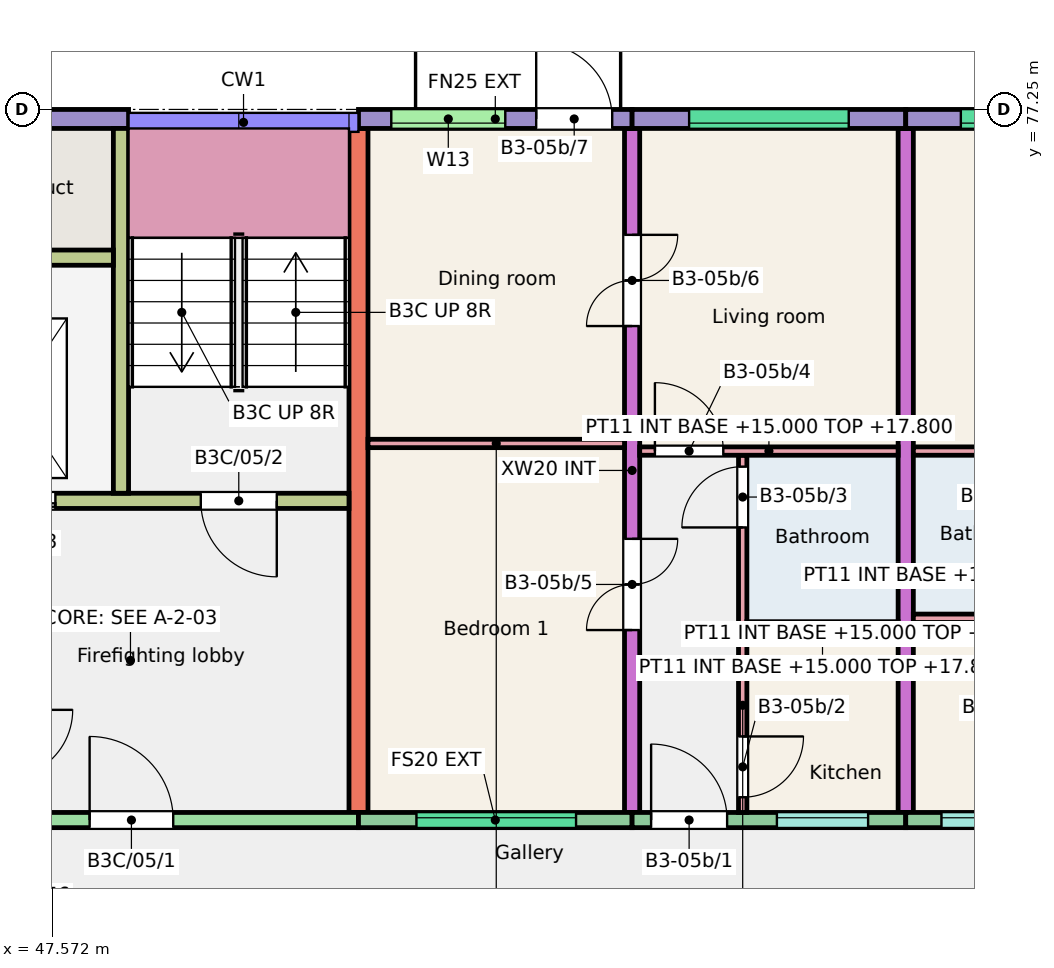
"""IFC4 building model, lengths in metres.
Left out: names, types, materials, properties, quantities, classifications, styles, units other than length and angle.
Written with IfcOpenShell. Run it as: python <this file> out.ifc"""

import sys

from ifc_helpers import new_model, si_unit, direction, frame, frame_2d, origin, place, context, subcontext, project, spatial, rectangle, extrude, element, fill, save


model = new_model("IFC4")
c1 = context("Model", 3, precision=1e-05, world=origin(), true_north=direction((0.0, 1.0)))
c2 = subcontext(c1, "Body", "Model", "MODEL_VIEW")
j1 = project(units=[si_unit("LENGTHUNIT", "METRE"), si_unit("PLANEANGLEUNIT", "RADIAN")], contexts=[c1])
p1 = place(None, origin())
s1 = spatial("IfcSite", under=j1, at=p1, CompositionType="ELEMENT")
p2 = place(p1, origin())
s2 = spatial("IfcBuilding", under=s1, at=p2, CompositionType="ELEMENT")
p3 = place(p2, frame((0.0, 0.0, 15.0)))
s3 = spatial("IfcBuildingStorey", under=s2, at=p3, CompositionType="ELEMENT", Elevation=15.0)
p4 = place(p3, frame((51.6, 68.0, 0.0), z_axis=(0.0, 0.0, 1.0), x_axis=(0.0, 1.0, 0.0)))
e1 = element("IfcWall", 1, at=p4, inside=s3, PredefinedType="SHEAR", context=c2, shape_type="SweptSolid", body=[
    extrude(rectangle(XDim=9.0, YDim=0.25, at=frame_2d((4.5, 0.0))), origin(), (0.0, 0.0, 1.0), 3.0),
])
p5 = place(p3, frame((55.2, 68.0, 0.0), z_axis=(0.0, 0.0, 1.0), x_axis=(0.0, 1.0, 0.0)))
e2 = element("IfcWall", 2, at=p5, inside=s3, PredefinedType="SHEAR", context=c2, shape_type="SweptSolid", body=[
    extrude(rectangle(XDim=9.0, YDim=0.2, at=frame_2d((4.5, 0.0))), origin(), (0.0, 0.0, 1.0), 3.0),
])
p6 = place(p5, frame((2.4, 0.0, 0.0)))
e3 = element("IfcOpeningElement", 3, at=p6, cuts=e2, PredefinedType="OPENING", context=c2, shape_type="SweptSolid", body=[
    extrude(rectangle(XDim=1.2, YDim=2.1, at=frame_2d((0.6, 1.05))), frame((0.0, 0.11, 0.0), z_axis=(0.0, -1.0, 0.0), x_axis=(1.0, 0.0, 0.0)), (0.0, 0.0, 1.0), 0.22),
])
p7 = place(p5, frame((6.4, 0.0, 0.0)))
e4 = element("IfcOpeningElement", 4, at=p7, cuts=e2, PredefinedType="OPENING", context=c2, shape_type="SweptSolid", body=[
    extrude(rectangle(XDim=1.2, YDim=2.1, at=frame_2d((0.6, 1.05))), frame((0.0, 0.11, 0.0), z_axis=(0.0, -1.0, 0.0), x_axis=(1.0, 0.0, 0.0)), (0.0, 0.0, 1.0), 0.22),
])
p8 = place(p3, frame((58.8, 68.0, 0.0), z_axis=(0.0, 0.0, 1.0), x_axis=(0.0, 1.0, 0.0)))
e5 = element("IfcWall", 5, at=p8, inside=s3, PredefinedType="SHEAR", context=c2, shape_type="SweptSolid", body=[
    extrude(rectangle(XDim=9.0, YDim=0.2, at=frame_2d((4.5, 0.0))), origin(), (0.0, 0.0, 1.0), 3.0),
])
p9 = place(p3, frame((45.6, 77.125, 0.0), z_axis=(0.0, 0.0, 1.0), x_axis=(1.0, 0.0, 0.0)))
e6 = element("IfcWall", 6, at=p9, inside=s3, PredefinedType="SOLIDWALL", context=c2, shape_type="SweptSolid", body=[
    extrude(rectangle(XDim=2.975, YDim=0.25, at=frame_2d((1.487, 0.0))), origin(), (0.0, 0.0, 1.0), 3.0),
])
p10 = place(p3, frame((45.75, 67.9, 0.0), z_axis=(0.0, 0.0, 1.0), x_axis=(1.0, 0.0, 0.0)))
e7 = element("IfcWall", 7, at=p10, inside=s3, PredefinedType="SHEAR", context=c2, shape_type="SweptSolid", body=[
    extrude(rectangle(XDim=5.85, YDim=0.2, at=frame_2d((2.925, 0.0))), origin(), (0.0, 0.0, 1.0), 3.0),
])
p11 = place(p10, frame((2.312, 0.0, 0.0)))
e8 = element("IfcOpeningElement", 8, at=p11, cuts=e7, PredefinedType="OPENING", context=c2, shape_type="SweptSolid", body=[
    extrude(rectangle(XDim=1.1, YDim=2.1, at=frame_2d((0.55, 1.05))), frame((0.0, 0.11, 0.0), z_axis=(0.0, -1.0, 0.0), x_axis=(1.0, 0.0, 0.0)), (0.0, 0.0, 1.0), 0.22),
])
p12 = place(p3, frame((45.75, 72.1, 0.0), z_axis=(0.0, 0.0, 1.0), x_axis=(1.0, 0.0, 0.0)))
e9 = element("IfcWall", 9, at=p12, inside=s3, PredefinedType="SHEAR", context=c2, shape_type="SweptSolid", body=[
    extrude(rectangle(XDim=5.725, YDim=0.2, at=frame_2d((2.863, 0.0))), origin(), (0.0, 0.0, 1.0), 3.0),
])
p13 = place(p12, frame((3.775, 0.0, 0.0)))
e10 = element("IfcOpeningElement", 10, at=p13, cuts=e9, PredefinedType="OPENING", context=c2, shape_type="SweptSolid", body=[
    extrude(rectangle(XDim=1.0, YDim=2.1, at=frame_2d((0.5, 1.05))), frame((0.0, 0.11, 0.0), z_axis=(0.0, -1.0, 0.0), x_axis=(1.0, 0.0, 0.0)), (0.0, 0.0, 1.0), 0.22),
])
p14 = place(p12, frame((0.762, 0.0, 0.0)))
e11 = element("IfcOpeningElement", 11, at=p14, cuts=e9, PredefinedType="OPENING", context=c2, shape_type="SweptSolid", body=[
    extrude(rectangle(XDim=1.1, YDim=2.1, at=frame_2d((0.55, 1.05))), frame((0.0, 0.11, 0.0), z_axis=(0.0, -1.0, 0.0), x_axis=(1.0, 0.0, 0.0)), (0.0, 0.0, 1.0), 0.22),
])
p15 = place(p3, frame((48.475, 72.2, 0.0), z_axis=(0.0, 0.0, 1.0), x_axis=(0.0, 1.0, 0.0)))
e12 = element("IfcWall", 12, at=p15, inside=s3, PredefinedType="SHEAR", context=c2, shape_type="SweptSolid", body=[
    extrude(rectangle(XDim=4.8, YDim=0.2, at=frame_2d((2.4, 0.0))), origin(), (0.0, 0.0, 1.0), 3.0),
])
p16 = place(p3, frame((45.75, 75.3, 0.0), z_axis=(0.0, 0.0, 1.0), x_axis=(1.0, 0.0, 0.0)))
e13 = element("IfcWall", 13, at=p16, inside=s3, PredefinedType="SHEAR", context=c2, shape_type="SweptSolid", body=[
    extrude(rectangle(XDim=2.625, YDim=0.2, at=frame_2d((1.312, 0.0))), origin(), (0.0, 0.0, 1.0), 3.0),
])
p17 = place(p3, frame((51.6, 77.125, 0.0), z_axis=(0.0, 0.0, 1.0), x_axis=(1.0, 0.0, 0.0)))
e14 = element("IfcWall", 14, at=p17, inside=s3, PredefinedType="SOLIDWALL", context=c2, shape_type="SweptSolid", body=[
    extrude(rectangle(XDim=3.6, YDim=0.25, at=frame_2d((1.8, 0.0))), origin(), (0.0, 0.0, 1.0), 3.0),
])
p18 = place(p17, frame((0.431, 0.0, 1.2)))
e15 = element("IfcOpeningElement", 15, at=p18, cuts=e14, PredefinedType="OPENING", context=c2, shape_type="SweptSolid", body=[
    extrude(rectangle(XDim=1.5, YDim=1.2, at=frame_2d((0.75, 0.6))), frame((0.0, 0.135, 0.0), z_axis=(0.0, -1.0, 0.0), x_axis=(1.0, 0.0, 0.0)), (0.0, 0.0, 1.0), 0.27),
])
p19 = place(p17, frame((2.338, 0.0, 0.0)))
e16 = element("IfcOpeningElement", 16, at=p19, cuts=e14, PredefinedType="OPENING", context=c2, shape_type="SweptSolid", body=[
    extrude(rectangle(XDim=1.0, YDim=2.1, at=frame_2d((0.5, 1.05))), frame((0.0, 0.135, 0.0), z_axis=(0.0, -1.0, 0.0), x_axis=(1.0, 0.0, 0.0)), (0.0, 0.0, 1.0), 0.27),
])
p20 = place(p3, frame((51.6, 67.9, 0.0), z_axis=(0.0, 0.0, 1.0), x_axis=(1.0, 0.0, 0.0)))
e17 = element("IfcWall", 17, at=p20, inside=s3, PredefinedType="SOLIDWALL", context=c2, shape_type="SweptSolid", body=[
    extrude(rectangle(XDim=3.6, YDim=0.2, at=frame_2d((1.8, 0.0))), origin(), (0.0, 0.0, 1.0), 3.0),
])
p21 = place(p20, frame((0.762, 0.0, 1.2)))
e18 = element("IfcOpeningElement", 18, at=p21, cuts=e17, PredefinedType="OPENING", context=c2, shape_type="SweptSolid", body=[
    extrude(rectangle(XDim=2.1, YDim=1.2, at=frame_2d((1.05, 0.6))), frame((0.0, 0.11, 0.0), z_axis=(0.0, -1.0, 0.0), x_axis=(1.0, 0.0, 0.0)), (0.0, 0.0, 1.0), 0.22),
])
p22 = place(p3, frame((55.2, 77.125, 0.0), z_axis=(0.0, 0.0, 1.0), x_axis=(1.0, 0.0, 0.0)))
e19 = element("IfcWall", 19, at=p22, inside=s3, PredefinedType="SOLIDWALL", context=c2, shape_type="SweptSolid", body=[
    extrude(rectangle(XDim=3.6, YDim=0.25, at=frame_2d((1.8, 0.0))), origin(), (0.0, 0.0, 1.0), 3.0),
])
p23 = place(p22, frame((0.75, 0.0, 1.2)))
e20 = element("IfcOpeningElement", 20, at=p23, cuts=e19, PredefinedType="OPENING", context=c2, shape_type="SweptSolid", body=[
    extrude(rectangle(XDim=2.1, YDim=1.2, at=frame_2d((1.05, 0.6))), frame((0.0, 0.135, 0.0), z_axis=(0.0, -1.0, 0.0), x_axis=(1.0, 0.0, 0.0)), (0.0, 0.0, 1.0), 0.27),
])
p24 = place(p3, frame((55.2, 67.9, 0.0), z_axis=(0.0, 0.0, 1.0), x_axis=(1.0, 0.0, 0.0)))
e21 = element("IfcWall", 21, at=p24, inside=s3, PredefinedType="SOLIDWALL", context=c2, shape_type="SweptSolid", body=[
    extrude(rectangle(XDim=3.6, YDim=0.2, at=frame_2d((1.8, 0.0))), origin(), (0.0, 0.0, 1.0), 3.0),
])
p25 = place(p24, frame((1.905, 0.0, 1.1)))
e22 = element("IfcOpeningElement", 22, at=p25, cuts=e21, PredefinedType="OPENING", context=c2, shape_type="SweptSolid", body=[
    extrude(rectangle(XDim=1.2, YDim=1.3, at=frame_2d((0.6, 0.65))), frame((0.0, 0.11, 0.0), z_axis=(0.0, -1.0, 0.0), x_axis=(1.0, 0.0, 0.0)), (0.0, 0.0, 1.0), 0.22),
])
p26 = place(p24, frame((0.25, 0.0, 0.0)))
e23 = element("IfcOpeningElement", 23, at=p26, cuts=e21, PredefinedType="OPENING", context=c2, shape_type="SweptSolid", body=[
    extrude(rectangle(XDim=1.0, YDim=2.1, at=frame_2d((0.5, 1.05))), frame((0.0, 0.11, 0.0), z_axis=(0.0, -1.0, 0.0), x_axis=(1.0, 0.0, 0.0)), (0.0, 0.0, 1.0), 0.22),
])
p27 = place(p3, frame((58.8, 77.125, 0.0), z_axis=(0.0, 0.0, 1.0), x_axis=(1.0, 0.0, 0.0)))
e24 = element("IfcWall", 24, at=p27, inside=s3, PredefinedType="SOLIDWALL", context=c2, shape_type="SweptSolid", body=[
    extrude(rectangle(XDim=3.6, YDim=0.25, at=frame_2d((1.8, 0.0))), origin(), (0.0, 0.0, 1.0), 3.0),
])
p28 = place(p27, frame((0.725, 0.0, 1.2)))
e25 = element("IfcOpeningElement", 25, at=p28, cuts=e24, PredefinedType="OPENING", context=c2, shape_type="SweptSolid", body=[
    extrude(rectangle(XDim=2.1, YDim=1.2, at=frame_2d((1.05, 0.6))), frame((0.0, 0.135, 0.0), z_axis=(0.0, -1.0, 0.0), x_axis=(1.0, 0.0, 0.0)), (0.0, 0.0, 1.0), 0.27),
])
p29 = place(p3, frame((58.8, 67.9, 0.0), z_axis=(0.0, 0.0, 1.0), x_axis=(1.0, 0.0, 0.0)))
e26 = element("IfcWall", 26, at=p29, inside=s3, PredefinedType="SOLIDWALL", context=c2, shape_type="SweptSolid", body=[
    extrude(rectangle(XDim=3.45, YDim=0.2, at=frame_2d((1.725, 0.0))), origin(), (0.0, 0.0, 1.0), 3.0),
])
p30 = place(p29, frame((0.47, 0.0, 1.1)))
e27 = element("IfcOpeningElement", 27, at=p30, cuts=e26, PredefinedType="OPENING", context=c2, shape_type="SweptSolid", body=[
    extrude(rectangle(XDim=1.2, YDim=1.3, at=frame_2d((0.6, 0.65))), frame((0.0, 0.11, 0.0), z_axis=(0.0, -1.0, 0.0), x_axis=(1.0, 0.0, 0.0)), (0.0, 0.0, 1.0), 0.22),
])
p31 = place(p29, frame((2.3, 0.0, 0.0)))
e28 = element("IfcOpeningElement", 28, at=p31, cuts=e26, PredefinedType="OPENING", context=c2, shape_type="SweptSolid", body=[
    extrude(rectangle(XDim=1.0, YDim=2.1, at=frame_2d((0.5, 1.05))), frame((0.0, 0.11, 0.0), z_axis=(0.0, -1.0, 0.0), x_axis=(1.0, 0.0, 0.0)), (0.0, 0.0, 1.0), 0.22),
])
p32 = place(p3, frame((58.9, 70.555, 0.0), z_axis=(0.0, 0.0, 1.0), x_axis=(1.0, 0.0, 0.0)))
e29 = element("IfcWall", 29, at=p32, inside=s3, PredefinedType="PARTITIONING", context=c2, shape_type="SweptSolid", body=[
    extrude(rectangle(XDim=1.94, YDim=0.11, at=frame_2d((0.97, 0.0))), origin(), (0.0, 0.0, 1.0), 2.75),
])
p33 = place(p3, frame((58.9, 72.755, 0.0), z_axis=(0.0, 0.0, 1.0), x_axis=(1.0, 0.0, 0.0)))
e30 = element("IfcWall", 30, at=p33, inside=s3, PredefinedType="PARTITIONING", context=c2, shape_type="SweptSolid", body=[
    extrude(rectangle(XDim=3.35, YDim=0.11, at=frame_2d((1.675, 0.0))), origin(), (0.0, 0.0, 1.0), 2.75),
])
p34 = place(p33, frame((2.25, 0.0, 0.0)))
e31 = element("IfcOpeningElement", 31, at=p34, cuts=e30, PredefinedType="OPENING", context=c2, shape_type="SweptSolid", body=[
    extrude(rectangle(XDim=0.9, YDim=2.1, at=frame_2d((0.45, 1.05))), frame((0.0, 0.065, 0.0), z_axis=(0.0, -1.0, 0.0), x_axis=(1.0, 0.0, 0.0)), (0.0, 0.0, 1.0), 0.13),
])
p35 = place(p3, frame((56.655, 68.0, 0.0), z_axis=(0.0, 0.0, 1.0), x_axis=(0.0, 1.0, 0.0)))
e32 = element("IfcWall", 32, at=p35, inside=s3, PredefinedType="PARTITIONING", context=c2, shape_type="SweptSolid", body=[
    extrude(rectangle(XDim=4.7, YDim=0.11, at=frame_2d((2.35, 0.0))), origin(), (0.0, 0.0, 1.0), 2.8),
])
p36 = place(p35, frame((0.2, 0.0, 0.0)))
e33 = element("IfcOpeningElement", 33, at=p36, cuts=e32, PredefinedType="OPENING", context=c2, shape_type="SweptSolid", body=[
    extrude(rectangle(XDim=0.8, YDim=2.1, at=frame_2d((0.4, 1.05))), frame((0.0, 0.065, 0.0), z_axis=(0.0, -1.0, 0.0), x_axis=(1.0, 0.0, 0.0)), (0.0, 0.0, 1.0), 0.13),
])
p37 = place(p35, frame((3.75, 0.0, 0.0)))
e34 = element("IfcOpeningElement", 34, at=p37, cuts=e32, PredefinedType="OPENING", context=c2, shape_type="SweptSolid", body=[
    extrude(rectangle(XDim=0.8, YDim=2.1, at=frame_2d((0.4, 1.05))), frame((0.0, 0.065, 0.0), z_axis=(0.0, -1.0, 0.0), x_axis=(1.0, 0.0, 0.0)), (0.0, 0.0, 1.0), 0.13),
])
p38 = place(p3, frame((56.71, 70.455, 0.0), z_axis=(0.0, 0.0, 1.0), x_axis=(1.0, 0.0, 0.0)))
e35 = element("IfcWall", 35, at=p38, inside=s3, PredefinedType="PARTITIONING", context=c2, shape_type="SweptSolid", body=[
    extrude(rectangle(XDim=1.99, YDim=0.11, at=frame_2d((0.995, 0.0))), origin(), (0.0, 0.0, 1.0), 2.8),
])
p39 = place(p3, frame((55.3, 72.755, 0.0), z_axis=(0.0, 0.0, 1.0), x_axis=(1.0, 0.0, 0.0)))
e36 = element("IfcWall", 36, at=p39, inside=s3, PredefinedType="PARTITIONING", context=c2, shape_type="SweptSolid", body=[
    extrude(rectangle(XDim=3.4, YDim=0.11, at=frame_2d((1.7, 0.0))), origin(), (0.0, 0.0, 1.0), 2.8),
])
p40 = place(p39, frame((0.2, 0.0, 0.0)))
e37 = element("IfcOpeningElement", 37, at=p40, cuts=e36, PredefinedType="OPENING", context=c2, shape_type="SweptSolid", body=[
    extrude(rectangle(XDim=0.9, YDim=2.1, at=frame_2d((0.45, 1.05))), frame((0.0, 0.065, 0.0), z_axis=(0.0, -1.0, 0.0), x_axis=(1.0, 0.0, 0.0)), (0.0, 0.0, 1.0), 0.13),
])
p41 = place(p3, frame((51.725, 72.855, 0.0), z_axis=(0.0, 0.0, 1.0), x_axis=(1.0, 0.0, 0.0)))
e38 = element("IfcWall", 38, at=p41, inside=s3, PredefinedType="PARTITIONING", context=c2, shape_type="SweptSolid", body=[
    extrude(rectangle(XDim=3.375, YDim=0.11, at=frame_2d((1.688, 0.0))), origin(), (0.0, 0.0, 1.0), 2.8),
])
p42 = place(p30, origin())
e39 = element("IfcWindow", 39, at=p42, inside=s3, PartitioningType="SINGLE_PANEL", PredefinedType="WINDOW", context=c2, shape_type="SweptSolid", body=[
    extrude(rectangle(XDim=1.2, YDim=1.3, at=frame_2d((0.6, 0.65))), frame((0.0, 0.06, 0.0), z_axis=(0.0, -1.0, 0.0), x_axis=(1.0, 0.0, 0.0)), (0.0, 0.0, 1.0), 0.06),
])
fill(e27, e39)
p43 = place(p28, origin())
e40 = element("IfcWindow", 40, at=p43, inside=s3, PartitioningType="SINGLE_PANEL", PredefinedType="WINDOW", context=c2, shape_type="SweptSolid", body=[
    extrude(rectangle(XDim=2.1, YDim=1.2, at=frame_2d((1.05, 0.6))), frame((0.0, -0.025, 0.0), z_axis=(0.0, -1.0, 0.0), x_axis=(1.0, 0.0, 0.0)), (0.0, 0.0, 1.0), 0.06),
])
fill(e25, e40)
p44 = place(p21, origin())
e41 = element("IfcWindow", 41, at=p44, inside=s3, PartitioningType="SINGLE_PANEL", PredefinedType="WINDOW", context=c2, shape_type="SweptSolid", body=[
    extrude(rectangle(XDim=2.1, YDim=1.2, at=frame_2d((1.05, 0.6))), frame((0.0, 0.06, 0.0), z_axis=(0.0, -1.0, 0.0), x_axis=(1.0, 0.0, 0.0)), (0.0, 0.0, 1.0), 0.06),
])
fill(e18, e41)
p45 = place(p18, origin())
e42 = element("IfcWindow", 42, at=p45, inside=s3, PartitioningType="SINGLE_PANEL", PredefinedType="WINDOW", context=c2, shape_type="SweptSolid", body=[
    extrude(rectangle(XDim=1.5, YDim=1.2, at=frame_2d((0.75, 0.6))), frame((0.0, -0.025, 0.0), z_axis=(0.0, -1.0, 0.0), x_axis=(1.0, 0.0, 0.0)), (0.0, 0.0, 1.0), 0.06),
])
fill(e15, e42)
p46 = place(p25, origin())
e43 = element("IfcWindow", 43, at=p46, inside=s3, PartitioningType="SINGLE_PANEL", PredefinedType="WINDOW", context=c2, shape_type="SweptSolid", body=[
    extrude(rectangle(XDim=1.2, YDim=1.3, at=frame_2d((0.6, 0.65))), frame((0.0, 0.06, 0.0), z_axis=(0.0, -1.0, 0.0), x_axis=(1.0, 0.0, 0.0)), (0.0, 0.0, 1.0), 0.06),
])
fill(e22, e43)
p47 = place(p23, origin())
e44 = element("IfcWindow", 44, at=p47, inside=s3, PartitioningType="SINGLE_PANEL", PredefinedType="WINDOW", context=c2, shape_type="SweptSolid", body=[
    extrude(rectangle(XDim=2.1, YDim=1.2, at=frame_2d((1.05, 0.6))), frame((0.0, -0.025, 0.0), z_axis=(0.0, -1.0, 0.0), x_axis=(1.0, 0.0, 0.0)), (0.0, 0.0, 1.0), 0.06),
])
fill(e20, e44)
p48 = place(p26, origin())
e45 = element("IfcDoor", 45, at=p48, inside=s3, OperationType="SINGLE_SWING_LEFT", PredefinedType="DOOR", context=c2, shape_type="SweptSolid", body=[
    extrude(rectangle(XDim=1.0, YDim=2.1, at=frame_2d((0.5, 1.05))), frame((0.0, 0.025, 0.0), z_axis=(0.0, -1.0, 0.0), x_axis=(1.0, 0.0, 0.0)), (0.0, 0.0, 1.0), 0.05),
])
fill(e23, e45)
p49 = place(p36, origin())
e46 = element("IfcDoor", 46, at=p49, inside=s3, OperationType="SINGLE_SWING_RIGHT", PredefinedType="DOOR", context=c2, shape_type="SweptSolid", body=[
    extrude(rectangle(XDim=0.8, YDim=2.1, at=frame_2d((0.4, 1.05))), frame((0.0, 0.025, 0.0), z_axis=(0.0, -1.0, 0.0), x_axis=(1.0, 0.0, 0.0)), (0.0, 0.0, 1.0), 0.05),
])
fill(e33, e46)
p50 = place(p37, origin())
e47 = element("IfcDoor", 47, at=p50, inside=s3, OperationType="SINGLE_SWING_LEFT", PredefinedType="DOOR", context=c2, shape_type="SweptSolid", body=[
    extrude(rectangle(XDim=0.8, YDim=2.1, at=frame_2d((0.4, 1.05))), frame((0.0, 0.025, 0.0), z_axis=(0.0, -1.0, 0.0), x_axis=(1.0, 0.0, 0.0)), (0.0, 0.0, 1.0), 0.05),
])
fill(e34, e47)
p51 = place(p40, origin())
e48 = element("IfcDoor", 48, at=p51, inside=s3, OperationType="SINGLE_SWING_LEFT", PredefinedType="DOOR", context=c2, shape_type="SweptSolid", body=[
    extrude(rectangle(XDim=0.9, YDim=2.1, at=frame_2d((0.45, 1.05))), frame((0.0, 0.025, 0.0), z_axis=(0.0, -1.0, 0.0), x_axis=(1.0, 0.0, 0.0)), (0.0, 0.0, 1.0), 0.05),
])
fill(e37, e48)
p52 = place(p6, origin())
e49 = element("IfcDoor", 49, at=p52, inside=s3, OperationType="DOUBLE_DOOR_SINGLE_SWING", PredefinedType="DOOR", context=c2, shape_type="SweptSolid", body=[
    extrude(rectangle(XDim=1.2, YDim=2.1, at=frame_2d((0.6, 1.05))), frame((0.0, 0.025, 0.0), z_axis=(0.0, -1.0, 0.0), x_axis=(1.0, 0.0, 0.0)), (0.0, 0.0, 1.0), 0.05),
])
fill(e3, e49)
p53 = place(p7, origin())
e50 = element("IfcDoor", 50, at=p53, inside=s3, OperationType="DOUBLE_DOOR_SINGLE_SWING", PredefinedType="DOOR", context=c2, shape_type="SweptSolid", body=[
    extrude(rectangle(XDim=1.2, YDim=2.1, at=frame_2d((0.6, 1.05))), frame((0.0, 0.025, 0.0), z_axis=(0.0, -1.0, 0.0), x_axis=(1.0, 0.0, 0.0)), (0.0, 0.0, 1.0), 0.05),
])
fill(e4, e50)
p54 = place(p19, origin())
e51 = element("IfcDoor", 51, at=p54, inside=s3, OperationType="SINGLE_SWING_LEFT", PredefinedType="DOOR", context=c2, shape_type="SweptSolid", body=[
    extrude(rectangle(XDim=1.0, YDim=2.1, at=frame_2d((0.5, 1.05))), frame((0.0, 0.025, 0.0), z_axis=(0.0, -1.0, 0.0), x_axis=(1.0, 0.0, 0.0)), (0.0, 0.0, 1.0), 0.05),
])
fill(e16, e51)
p55 = place(p11, origin())
e52 = element("IfcDoor", 52, at=p55, inside=s3, OperationType="SINGLE_SWING_LEFT", PredefinedType="DOOR", context=c2, shape_type="SweptSolid", body=[
    extrude(rectangle(XDim=1.1, YDim=2.1, at=frame_2d((0.55, 1.05))), frame((0.0, 0.025, 0.0), z_axis=(0.0, -1.0, 0.0), x_axis=(1.0, 0.0, 0.0)), (0.0, 0.0, 1.0), 0.05),
])
fill(e8, e52)
p56 = place(p13, origin())
e53 = element("IfcDoor", 53, at=p56, inside=s3, OperationType="SINGLE_SWING_RIGHT", PredefinedType="DOOR", context=c2, shape_type="SweptSolid", body=[
    extrude(rectangle(XDim=1.0, YDim=2.1, at=frame_2d((0.5, 1.05))), frame((0.0, 0.025, 0.0), z_axis=(0.0, -1.0, 0.0), x_axis=(1.0, 0.0, 0.0)), (0.0, 0.0, 1.0), 0.05),
])
fill(e10, e53)
p57 = place(p14, origin())
e54 = element("IfcDoor", 54, at=p57, inside=s3, OperationType="DOUBLE_DOOR_SLIDING", PredefinedType="DOOR", context=c2, shape_type="SweptSolid", body=[
    extrude(rectangle(XDim=1.1, YDim=2.1, at=frame_2d((0.55, 1.05))), frame((0.0, 0.025, 0.0), z_axis=(0.0, -1.0, 0.0), x_axis=(1.0, 0.0, 0.0)), (0.0, 0.0, 1.0), 0.05),
])
fill(e11, e54)
save(model, sys.argv[1])
